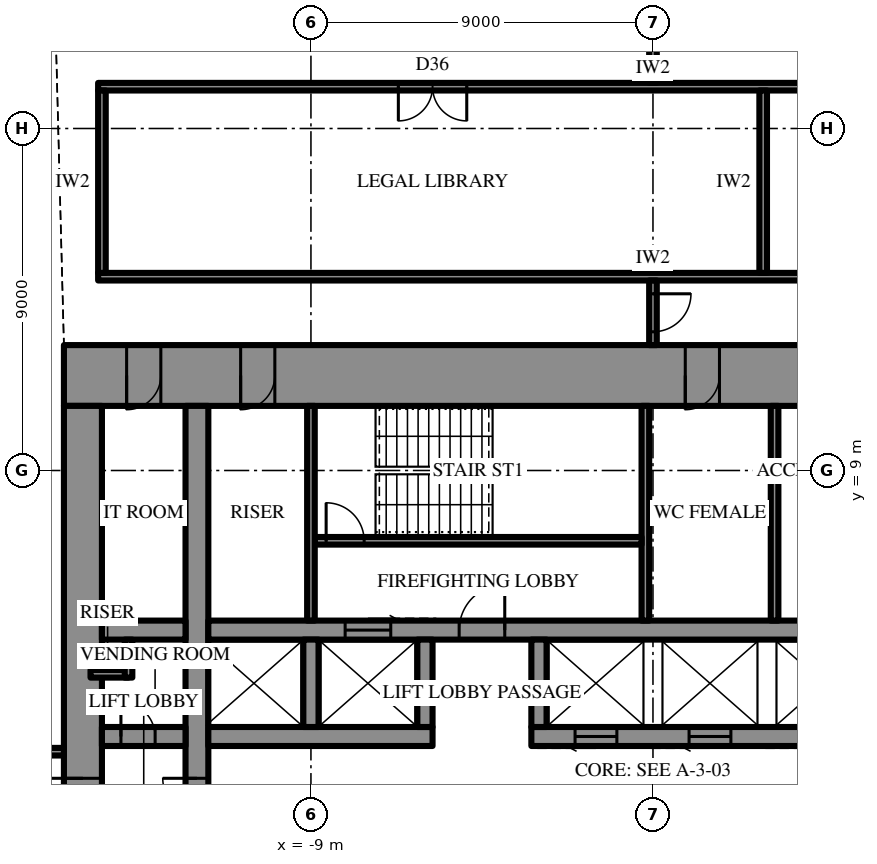
"""IFC4 building model, lengths in metres.
Left out: names, types, materials, properties, quantities, classifications, styles, units other than length and angle.
Written with IfcOpenShell. Run it as: python <this file> out.ifc"""

import sys

from ifc_helpers import new_model, si_unit, direction, frame, frame_2d, origin, place, context, subcontext, project, spatial, rectangle, extrude, element, fill, save


model = new_model("IFC4")
c1 = context("Model", 3, precision=1e-05, world=origin(), true_north=direction((0.0, 1.0)))
c2 = subcontext(c1, "Body", "Model", "MODEL_VIEW")
j1 = project(units=[si_unit("LENGTHUNIT", "METRE"), si_unit("PLANEANGLEUNIT", "RADIAN")], contexts=[c1])
p1 = place(None, origin())
s1 = spatial("IfcSite", under=j1, at=p1, CompositionType="ELEMENT")
p2 = place(p1, origin())
s2 = spatial("IfcBuilding", under=s1, at=p2, CompositionType="ELEMENT")
p3 = place(p2, frame((0.0, 0.0, 219.7)))
s3 = spatial("IfcBuildingStorey", under=s2, at=p3, CompositionType="ELEMENT", Elevation=219.7)
p4 = place(p3, frame((-15.5, 11.5, 0.0), z_axis=(0.0, 0.0, 1.0), x_axis=(1.0, 0.0, 0.0)))
e1 = element("IfcWall", 1, at=p4, inside=s3, PredefinedType="SHEAR", context=c2, shape_type="SweptSolid", body=[
    extrude(rectangle(XDim=31.0, YDim=1.6, at=frame_2d((15.5, 0.0))), origin(), (0.0, 0.0, 1.0), 4.2),
])
p5 = place(p4, frame((16.35, 0.0, 0.0)))
e2 = element("IfcOpeningElement", 2, at=p5, cuts=e1, PredefinedType="OPENING", context=c2, shape_type="SweptSolid", body=[
    extrude(rectangle(XDim=0.9, YDim=2.2, at=frame_2d((0.45, 1.1))), frame((0.0, 0.81, 0.0), z_axis=(0.0, -1.0, 0.0), x_axis=(1.0, 0.0, 0.0)), (0.0, 0.0, 1.0), 1.62),
])
p6 = place(p4, frame((19.35, 0.0, 0.0)))
e3 = element("IfcOpeningElement", 3, at=p6, cuts=e1, PredefinedType="OPENING", context=c2, shape_type="SweptSolid", body=[
    extrude(rectangle(XDim=0.9, YDim=2.2, at=frame_2d((0.45, 1.1))), frame((0.0, 0.81, 0.0), z_axis=(0.0, -1.0, 0.0), x_axis=(1.0, 0.0, 0.0)), (0.0, 0.0, 1.0), 1.62),
])
p7 = place(p4, frame((22.4, 0.0, 0.0)))
e4 = element("IfcOpeningElement", 4, at=p7, cuts=e1, PredefinedType="OPENING", context=c2, shape_type="SweptSolid", body=[
    extrude(rectangle(XDim=1.0, YDim=2.2, at=frame_2d((0.5, 1.1))), frame((0.0, 0.81, 0.0), z_axis=(0.0, -1.0, 0.0), x_axis=(1.0, 0.0, 0.0)), (0.0, 0.0, 1.0), 1.62),
])
p8 = place(p4, frame((1.65, 0.0, 0.0)))
e5 = element("IfcOpeningElement", 5, at=p8, cuts=e1, PredefinedType="OPENING", context=c2, shape_type="SweptSolid", body=[
    extrude(rectangle(XDim=0.9, YDim=2.2, at=frame_2d((0.45, 1.1))), frame((0.0, 0.81, 0.0), z_axis=(0.0, -1.0, 0.0), x_axis=(1.0, 0.0, 0.0)), (0.0, 0.0, 1.0), 1.62),
])
p9 = place(p4, frame((4.65, 0.0, 0.0)))
e6 = element("IfcOpeningElement", 6, at=p9, cuts=e1, PredefinedType="OPENING", context=c2, shape_type="SweptSolid", body=[
    extrude(rectangle(XDim=0.9, YDim=2.2, at=frame_2d((0.45, 1.1))), frame((0.0, 0.81, 0.0), z_axis=(0.0, -1.0, 0.0), x_axis=(1.0, 0.0, 0.0)), (0.0, 0.0, 1.0), 1.62),
])
p10 = place(p4, frame((25.45, 0.0, 0.0)))
e7 = element("IfcOpeningElement", 7, at=p10, cuts=e1, PredefinedType="OPENING", context=c2, shape_type="SweptSolid", body=[
    extrude(rectangle(XDim=0.9, YDim=2.2, at=frame_2d((0.45, 1.1))), frame((0.0, 0.81, 0.0), z_axis=(0.0, -1.0, 0.0), x_axis=(1.0, 0.0, 0.0)), (0.0, 0.0, 1.0), 1.62),
])
p11 = place(p4, frame((28.45, 0.0, 0.0)))
e8 = element("IfcOpeningElement", 8, at=p11, cuts=e1, PredefinedType="OPENING", context=c2, shape_type="SweptSolid", body=[
    extrude(rectangle(XDim=0.9, YDim=2.2, at=frame_2d((0.45, 1.1))), frame((0.0, 0.81, 0.0), z_axis=(0.0, -1.0, 0.0), x_axis=(1.0, 0.0, 0.0)), (0.0, 0.0, 1.0), 1.62),
])
p12 = place(p3, frame((-15.0, 10.7, 0.0), z_axis=(0.0, 0.0, 1.0), x_axis=(0.0, -1.0, 0.0)))
e9 = element("IfcWall", 9, at=p12, inside=s3, PredefinedType="SHEAR", context=c2, shape_type="SweptSolid", body=[
    extrude(rectangle(XDim=21.4, YDim=1.0, at=frame_2d((10.7, 0.0))), origin(), (0.0, 0.0, 1.0), 4.2),
])
p13 = place(p12, frame((9.8, 0.0, 0.0)))
e10 = element("IfcOpeningElement", 10, at=p13, cuts=e9, PredefinedType="OPENING", context=c2, shape_type="SweptSolid", body=[
    extrude(rectangle(XDim=1.8, YDim=2.4, at=frame_2d((0.9, 1.2))), frame((0.0, 0.51, 0.0), z_axis=(0.0, -1.0, 0.0), x_axis=(1.0, 0.0, 0.0)), (0.0, 0.0, 1.0), 1.02),
])
p14 = place(p3, frame((-12.0, -10.7, 0.0), z_axis=(0.0, 0.0, 1.0), x_axis=(0.0, 1.0, 0.0)))
e11 = element("IfcWall", 11, at=p14, inside=s3, PredefinedType="SHEAR", context=c2, shape_type="SweptSolid", body=[
    extrude(rectangle(XDim=21.4, YDim=0.6, at=frame_2d((10.7, 0.0))), origin(), (0.0, 0.0, 1.0), 4.2),
])
p15 = place(p14, frame((9.8, 0.0, 0.0)))
e12 = element("IfcOpeningElement", 12, at=p15, cuts=e11, PredefinedType="OPENING", context=c2, shape_type="SweptSolid", body=[
    extrude(rectangle(XDim=1.8, YDim=2.4, at=frame_2d((0.9, 1.2))), frame((0.0, 0.31, 0.0), z_axis=(0.0, -1.0, 0.0), x_axis=(1.0, 0.0, 0.0)), (0.0, 0.0, 1.0), 0.62),
])
p16 = place(p3, frame((-14.5, 2.0, 0.0), z_axis=(0.0, 0.0, 1.0), x_axis=(1.0, 0.0, 0.0)))
e13 = element("IfcWall", 13, at=p16, inside=s3, PredefinedType="SHEAR", context=c2, shape_type="SweptSolid", body=[
    extrude(rectangle(XDim=2.2, YDim=0.5, at=frame_2d((1.1, 0.0))), origin(), (0.0, 0.0, 1.0), 4.2),
])
p17 = place(p16, frame((0.5, 0.0, 0.0)))
e14 = element("IfcOpeningElement", 14, at=p17, cuts=e13, PredefinedType="OPENING", context=c2, shape_type="SweptSolid", body=[
    extrude(rectangle(XDim=0.9, YDim=2.2, at=frame_2d((0.45, 1.1))), frame((0.0, 0.26, 0.0), z_axis=(0.0, -1.0, 0.0), x_axis=(1.0, 0.0, 0.0)), (0.0, 0.0, 1.0), 0.52),
])
p18 = place(p3, frame((-11.7, 2.0, 0.0), z_axis=(0.0, 0.0, 1.0), x_axis=(1.0, 0.0, 0.0)))
e15 = element("IfcWall", 15, at=p18, inside=s3, PredefinedType="SHEAR", context=c2, shape_type="SweptSolid", body=[
    extrude(rectangle(XDim=5.9, YDim=0.5, at=frame_2d((2.95, 0.0))), origin(), (0.0, 0.0, 1.0), 4.2),
])
p19 = place(p3, frame((-3.2, 2.0, 0.0), z_axis=(0.0, 0.0, 1.0), x_axis=(1.0, 0.0, 0.0)))
e16 = element("IfcWall", 16, at=p19, inside=s3, PredefinedType="SHEAR", context=c2, shape_type="SweptSolid", body=[
    extrude(rectangle(XDim=14.9, YDim=0.5, at=frame_2d((7.45, 0.0))), origin(), (0.0, 0.0, 1.0), 4.2),
])
p20 = place(p19, frame((1.15, 0.0, 0.0)))
e17 = element("IfcOpeningElement", 17, at=p20, cuts=e16, PredefinedType="OPENING", context=c2, shape_type="SweptSolid", body=[
    extrude(rectangle(XDim=1.1, YDim=2.2, at=frame_2d((0.55, 1.1))), frame((0.0, 0.26, 0.0), z_axis=(0.0, -1.0, 0.0), x_axis=(1.0, 0.0, 0.0)), (0.0, 0.0, 1.0), 0.52),
])
p21 = place(p19, frame((4.15, 0.0, 0.0)))
e18 = element("IfcOpeningElement", 18, at=p21, cuts=e16, PredefinedType="OPENING", context=c2, shape_type="SweptSolid", body=[
    extrude(rectangle(XDim=1.1, YDim=2.2, at=frame_2d((0.55, 1.1))), frame((0.0, 0.26, 0.0), z_axis=(0.0, -1.0, 0.0), x_axis=(1.0, 0.0, 0.0)), (0.0, 0.0, 1.0), 0.52),
])
p22 = place(p19, frame((7.15, 0.0, 0.0)))
e19 = element("IfcOpeningElement", 19, at=p22, cuts=e16, PredefinedType="OPENING", context=c2, shape_type="SweptSolid", body=[
    extrude(rectangle(XDim=1.1, YDim=2.2, at=frame_2d((0.55, 1.1))), frame((0.0, 0.26, 0.0), z_axis=(0.0, -1.0, 0.0), x_axis=(1.0, 0.0, 0.0)), (0.0, 0.0, 1.0), 0.52),
])
p23 = place(p19, frame((10.15, 0.0, 0.0)))
e20 = element("IfcOpeningElement", 20, at=p23, cuts=e16, PredefinedType="OPENING", context=c2, shape_type="SweptSolid", body=[
    extrude(rectangle(XDim=1.1, YDim=2.2, at=frame_2d((0.55, 1.1))), frame((0.0, 0.26, 0.0), z_axis=(0.0, -1.0, 0.0), x_axis=(1.0, 0.0, 0.0)), (0.0, 0.0, 1.0), 0.52),
])
p24 = place(p3, frame((-14.5, 4.8, 0.0), z_axis=(0.0, 0.0, 1.0), x_axis=(1.0, 0.0, 0.0)))
e21 = element("IfcWall", 21, at=p24, inside=s3, PredefinedType="SHEAR", context=c2, shape_type="SweptSolid", body=[
    extrude(rectangle(XDim=2.2, YDim=0.5, at=frame_2d((1.1, 0.0))), origin(), (0.0, 0.0, 1.0), 4.2),
])
p25 = place(p3, frame((-11.7, 4.8, 0.0), z_axis=(0.0, 0.0, 1.0), x_axis=(1.0, 0.0, 0.0)))
e22 = element("IfcWall", 22, at=p25, inside=s3, PredefinedType="SHEAR", context=c2, shape_type="SweptSolid", body=[
    extrude(rectangle(XDim=23.4, YDim=0.5, at=frame_2d((11.7, 0.0))), origin(), (0.0, 0.0, 1.0), 4.2),
])
p26 = place(p25, frame((6.6, 0.0, 0.0)))
e23 = element("IfcOpeningElement", 23, at=p26, cuts=e22, PredefinedType="OPENING", context=c2, shape_type="SweptSolid", body=[
    extrude(rectangle(XDim=1.2, YDim=2.2, at=frame_2d((0.6, 1.1))), frame((0.0, 0.26, 0.0), z_axis=(0.0, -1.0, 0.0), x_axis=(1.0, 0.0, 0.0)), (0.0, 0.0, 1.0), 0.52),
])
p27 = place(p25, frame((3.6, 0.0, 0.0)))
e24 = element("IfcOpeningElement", 24, at=p27, cuts=e22, PredefinedType="OPENING", context=c2, shape_type="SweptSolid", body=[
    extrude(rectangle(XDim=1.2, YDim=2.2, at=frame_2d((0.6, 1.1))), frame((0.0, 0.26, 0.0), z_axis=(0.0, -1.0, 0.0), x_axis=(1.0, 0.0, 0.0)), (0.0, 0.0, 1.0), 0.52),
])
for number, where, z_axis, x_axis in (
    (25, (-9.0, 2.25, 0.0), (0.0, 0.0, 1.0), (0.0, 1.0, 0.0)),
    (26, (-6.0, 2.25, 0.0), (0.0, 0.0, 1.0), (0.0, 1.0, 0.0)),
    (27, (-3.0, 2.25, 0.0), (0.0, 0.0, 1.0), (0.0, 1.0, 0.0)),
):
    element("IfcWall", number, at=place(p3, frame(where, z_axis=z_axis, x_axis=x_axis)), inside=s3, PredefinedType="SHEAR", context=c2, shape_type="SweptSolid", body=[
        extrude(rectangle(XDim=2.3, YDim=0.4, at=frame_2d((1.15, 0.0))), origin(), (0.0, 0.0, 1.0), 4.2),
    ])
p28 = place(p3, frame((-0.2, 5.05, 0.0), z_axis=(0.0, 0.0, 1.0), x_axis=(0.0, 1.0, 0.0)))
e28 = element("IfcWall", 28, at=p28, inside=s3, PredefinedType="SHEAR", context=c2, shape_type="SweptSolid", body=[
    extrude(rectangle(XDim=5.65, YDim=0.2, at=frame_2d((2.825, 0.0))), origin(), (0.0, 0.0, 1.0), 4.2),
])
p29 = place(p3, frame((-8.9, 7.15, 0.0), z_axis=(0.0, 0.0, 1.0), x_axis=(1.0, 0.0, 0.0)))
e29 = element("IfcWall", 29, at=p29, inside=s3, PredefinedType="SHEAR", context=c2, shape_type="SweptSolid", body=[
    extrude(rectangle(XDim=8.6, YDim=0.2, at=frame_2d((4.3, 0.0))), origin(), (0.0, 0.0, 1.0), 4.2),
])
p30 = place(p29, frame((0.3, 0.0, 0.0)))
e30 = element("IfcOpeningElement", 30, at=p30, cuts=e29, PredefinedType="OPENING", context=c2, shape_type="SweptSolid", body=[
    extrude(rectangle(XDim=1.0, YDim=2.2, at=frame_2d((0.5, 1.1))), frame((0.0, 0.11, 0.0), z_axis=(0.0, -1.0, 0.0), x_axis=(1.0, 0.0, 0.0)), (0.0, 0.0, 1.0), 0.22),
])
for number, where, z_axis, x_axis in (
    (31, (-9.0, 5.05, 0.0), (0.0, 0.0, 1.0), (0.0, 1.0, 0.0)),
    (32, (3.2, 5.05, 0.0), (0.0, 0.0, 1.0), (0.0, 1.0, 0.0)),
):
    element("IfcWall", number, at=place(p3, frame(where, z_axis=z_axis, x_axis=x_axis)), inside=s3, PredefinedType="PARTITIONING", context=c2, shape_type="SweptSolid", body=[
        extrude(rectangle(XDim=5.65, YDim=0.2, at=frame_2d((2.825, 0.0))), origin(), (0.0, 0.0, 1.0), 4.0),
    ])
for number, where, z_axis, x_axis in (
    (33, (-14.8, 3.65, 0.0), (0.0, 0.0, 1.0), (1.0, 0.0, 0.0)),
    (34, (-13.8, 3.55, 0.0), (0.0, 0.0, 1.0), (0.0, 1.0, 0.0)),
):
    element("IfcWall", number, at=place(p3, frame(where, z_axis=z_axis, x_axis=x_axis)), inside=s3, PredefinedType="PARTITIONING", context=c2, shape_type="SweptSolid", body=[
        extrude(rectangle(XDim=1.0, YDim=0.2, at=frame_2d((0.5, 0.0))), origin(), (0.0, 0.0, 1.0), 4.0),
    ])
p31 = place(p3, frame((-14.6, 14.1, 0.0), z_axis=(0.0, 0.0, 1.0), x_axis=(1.0, 0.0, 0.0)))
e35 = element("IfcWall", 35, at=p31, inside=s3, PredefinedType="PARTITIONING", context=c2, shape_type="SweptSolid", body=[
    extrude(rectangle(XDim=29.2, YDim=0.2, at=frame_2d((14.6, 0.0))), origin(), (0.0, 0.0, 1.0), 4.0),
])
p32 = place(p3, frame((-14.6, 19.1, 0.0), z_axis=(0.0, 0.0, 1.0), x_axis=(1.0, 0.0, 0.0)))
e36 = element("IfcWall", 36, at=p32, inside=s3, PredefinedType="PARTITIONING", context=c2, shape_type="SweptSolid", body=[
    extrude(rectangle(XDim=29.2, YDim=0.2, at=frame_2d((14.6, 0.0))), origin(), (0.0, 0.0, 1.0), 4.0),
])
p33 = place(p32, frame((7.9, 0.0, 0.0)))
e37 = element("IfcOpeningElement", 37, at=p33, cuts=e36, PredefinedType="OPENING", context=c2, shape_type="SweptSolid", body=[
    extrude(rectangle(XDim=1.8, YDim=2.4, at=frame_2d((0.9, 1.2))), frame((0.0, 0.11, 0.0), z_axis=(0.0, -1.0, 0.0), x_axis=(1.0, 0.0, 0.0)), (0.0, 0.0, 1.0), 0.22),
])
p34 = place(p32, frame((22.4, 0.0, 0.0)))
e38 = element("IfcOpeningElement", 38, at=p34, cuts=e36, PredefinedType="OPENING", context=c2, shape_type="SweptSolid", body=[
    extrude(rectangle(XDim=1.8, YDim=2.4, at=frame_2d((0.9, 1.2))), frame((0.0, 0.11, 0.0), z_axis=(0.0, -1.0, 0.0), x_axis=(1.0, 0.0, 0.0)), (0.0, 0.0, 1.0), 0.22),
])
for number, where, z_axis, x_axis in (
    (39, (-14.5, 14.2, 0.0), (0.0, 0.0, 1.0), (0.0, 1.0, 0.0)),
    (40, (2.9, 14.2, 0.0), (0.0, 0.0, 1.0), (0.0, 1.0, 0.0)),
):
    element("IfcWall", number, at=place(p3, frame(where, z_axis=z_axis, x_axis=x_axis)), inside=s3, PredefinedType="PARTITIONING", context=c2, shape_type="SweptSolid", body=[
        extrude(rectangle(XDim=4.8, YDim=0.2, at=frame_2d((2.4, 0.0))), origin(), (0.0, 0.0, 1.0), 4.0),
    ])
p35 = place(p3, frame((-15.5, 1.6, 0.0), z_axis=(0.0, 0.0, 1.0), x_axis=(-1.0, 0.0, 0.0)))
e41 = element("IfcWall", 41, at=p35, inside=s3, PredefinedType="PARTITIONING", context=c2, shape_type="SweptSolid", body=[
    extrude(rectangle(XDim=12.2, YDim=0.2, at=frame_2d((6.1, 0.0))), origin(), (0.0, 0.0, 1.0), 4.0),
])
p36 = place(p35, frame((3.16, 0.0, 0.0)))
e42 = element("IfcOpeningElement", 42, at=p36, cuts=e41, PredefinedType="OPENING", context=c2, shape_type="SweptSolid", body=[
    extrude(rectangle(XDim=1.0, YDim=2.2, at=frame_2d((0.5, 1.1))), frame((0.0, 0.11, 0.0), z_axis=(0.0, -1.0, 0.0), x_axis=(1.0, 0.0, 0.0)), (0.0, 0.0, 1.0), 0.22),
])
p37 = place(p3, frame((0.0, 12.3, 0.0), z_axis=(0.0, 0.0, 1.0), x_axis=(0.0, 1.0, 0.0)))
e43 = element("IfcWall", 43, at=p37, inside=s3, PredefinedType="PARTITIONING", context=c2, shape_type="SweptSolid", body=[
    extrude(rectangle(XDim=1.7, YDim=0.2, at=frame_2d((0.85, 0.0))), origin(), (0.0, 0.0, 1.0), 2.992),
])
p38 = place(p37, frame((0.35, 0.0, 0.0)))
e44 = element("IfcOpeningElement", 44, at=p38, cuts=e43, PredefinedType="OPENING", context=c2, shape_type="SweptSolid", body=[
    extrude(rectangle(XDim=1.0, YDim=2.2, at=frame_2d((0.5, 1.1))), frame((0.0, 0.11, 0.0), z_axis=(0.0, -1.0, 0.0), x_axis=(1.0, 0.0, 0.0)), (0.0, 0.0, 1.0), 0.22),
])
p39 = place(p3, frame((0.0, 19.2, 0.0), z_axis=(0.0, 0.0, 1.0), x_axis=(0.0, 1.0, 0.0)))
e45 = element("IfcWall", 45, at=p39, inside=s3, PredefinedType="PARTITIONING", context=c2, shape_type="SweptSolid", body=[
    extrude(rectangle(XDim=5.2, YDim=0.2, at=frame_2d((2.6, 0.0))), origin(), (0.0, 0.0, 1.0), 2.992),
])
p40 = place(p13, frame((1.8, 0.0, 0.0), z_axis=(0.0, 0.0, 1.0), x_axis=(-1.0, 0.0, 0.0)))
e46 = element("IfcDoor", 46, at=p40, inside=s3, OperationType="DOUBLE_DOOR_SINGLE_SWING", PredefinedType="DOOR", context=c2, shape_type="SweptSolid", body=[
    extrude(rectangle(XDim=1.8, YDim=2.4, at=frame_2d((0.9, 1.2))), frame((0.0, 0.025, 0.0), z_axis=(0.0, -1.0, 0.0), x_axis=(1.0, 0.0, 0.0)), (0.0, 0.0, 1.0), 0.05),
])
fill(e10, e46)
p41 = place(p26, origin())
e47 = element("IfcDoor", 47, at=p41, inside=s3, OperationType="SINGLE_SWING_LEFT", PredefinedType="DOOR", context=c2, shape_type="SweptSolid", body=[
    extrude(rectangle(XDim=1.2, YDim=2.2, at=frame_2d((0.6, 1.1))), frame((0.0, 0.025, 0.0), z_axis=(0.0, -1.0, 0.0), x_axis=(1.0, 0.0, 0.0)), (0.0, 0.0, 1.0), 0.05),
])
fill(e23, e47)
p42 = place(p30, origin())
e48 = element("IfcDoor", 48, at=p42, inside=s3, OperationType="SINGLE_SWING_RIGHT", PredefinedType="DOOR", context=c2, shape_type="SweptSolid", body=[
    extrude(rectangle(XDim=1.0, YDim=2.2, at=frame_2d((0.5, 1.1))), frame((0.0, 0.025, 0.0), z_axis=(0.0, -1.0, 0.0), x_axis=(1.0, 0.0, 0.0)), (0.0, 0.0, 1.0), 0.05),
])
fill(e30, e48)
p43 = place(p5, frame((0.9, 0.0, 0.0), z_axis=(0.0, 0.0, 1.0), x_axis=(-1.0, 0.0, 0.0)))
e49 = element("IfcDoor", 49, at=p43, inside=s3, OperationType="SINGLE_SWING_LEFT", PredefinedType="DOOR", context=c2, shape_type="SweptSolid", body=[
    extrude(rectangle(XDim=0.9, YDim=2.2, at=frame_2d((0.45, 1.1))), frame((0.0, 0.025, 0.0), z_axis=(0.0, -1.0, 0.0), x_axis=(1.0, 0.0, 0.0)), (0.0, 0.0, 1.0), 0.05),
])
fill(e2, e49)
p44 = place(p8, frame((0.9, 0.0, 0.0), z_axis=(0.0, 0.0, 1.0), x_axis=(-1.0, 0.0, 0.0)))
e50 = element("IfcDoor", 50, at=p44, inside=s3, OperationType="SINGLE_SWING_LEFT", PredefinedType="DOOR", context=c2, shape_type="SweptSolid", body=[
    extrude(rectangle(XDim=0.9, YDim=2.2, at=frame_2d((0.45, 1.1))), frame((0.0, 0.025, 0.0), z_axis=(0.0, -1.0, 0.0), x_axis=(1.0, 0.0, 0.0)), (0.0, 0.0, 1.0), 0.05),
])
fill(e5, e50)
p45 = place(p9, frame((0.9, 0.0, 0.0), z_axis=(0.0, 0.0, 1.0), x_axis=(-1.0, 0.0, 0.0)))
e51 = element("IfcDoor", 51, at=p45, inside=s3, OperationType="SINGLE_SWING_LEFT", PredefinedType="DOOR", context=c2, shape_type="SweptSolid", body=[
    extrude(rectangle(XDim=0.9, YDim=2.2, at=frame_2d((0.45, 1.1))), frame((0.0, 0.025, 0.0), z_axis=(0.0, -1.0, 0.0), x_axis=(1.0, 0.0, 0.0)), (0.0, 0.0, 1.0), 0.05),
])
fill(e6, e51)
p46 = place(p17, origin())
e52 = element("IfcDoor", 52, at=p46, inside=s3, OperationType="SINGLE_SWING_RIGHT", PredefinedType="DOOR", context=c2, shape_type="SweptSolid", body=[
    extrude(rectangle(XDim=0.9, YDim=2.2, at=frame_2d((0.45, 1.1))), frame((0.0, 0.025, 0.0), z_axis=(0.0, -1.0, 0.0), x_axis=(1.0, 0.0, 0.0)), (0.0, 0.0, 1.0), 0.05),
])
fill(e14, e52)
p47 = place(p15, origin())
e53 = element("IfcDoor", 53, at=p47, inside=s3, OperationType="DOUBLE_DOOR_SINGLE_SWING", PredefinedType="DOOR", context=c2, shape_type="SweptSolid", body=[
    extrude(rectangle(XDim=1.8, YDim=2.4, at=frame_2d((0.9, 1.2))), frame((0.0, 0.025, 0.0), z_axis=(0.0, -1.0, 0.0), x_axis=(1.0, 0.0, 0.0)), (0.0, 0.0, 1.0), 0.05),
])
fill(e12, e53)
p48 = place(p27, origin())
e54 = element("IfcDoor", 54, at=p48, inside=s3, OperationType="SLIDING_TO_LEFT", PredefinedType="DOOR", context=c2, shape_type="SweptSolid", body=[
    extrude(rectangle(XDim=1.2, YDim=2.2, at=frame_2d((0.6, 1.1))), frame((0.0, 0.025, 0.0), z_axis=(0.0, -1.0, 0.0), x_axis=(1.0, 0.0, 0.0)), (0.0, 0.0, 1.0), 0.05),
])
fill(e24, e54)
p49 = place(p20, frame((1.1, 0.0, 0.0), z_axis=(0.0, 0.0, 1.0), x_axis=(-1.0, 0.0, 0.0)))
e55 = element("IfcDoor", 55, at=p49, inside=s3, OperationType="SLIDING_TO_LEFT", PredefinedType="DOOR", context=c2, shape_type="SweptSolid", body=[
    extrude(rectangle(XDim=1.1, YDim=2.2, at=frame_2d((0.55, 1.1))), frame((0.0, 0.025, 0.0), z_axis=(0.0, -1.0, 0.0), x_axis=(1.0, 0.0, 0.0)), (0.0, 0.0, 1.0), 0.05),
])
fill(e17, e55)
p50 = place(p21, frame((1.1, 0.0, 0.0), z_axis=(0.0, 0.0, 1.0), x_axis=(-1.0, 0.0, 0.0)))
e56 = element("IfcDoor", 56, at=p50, inside=s3, OperationType="SLIDING_TO_LEFT", PredefinedType="DOOR", context=c2, shape_type="SweptSolid", body=[
    extrude(rectangle(XDim=1.1, YDim=2.2, at=frame_2d((0.55, 1.1))), frame((0.0, 0.025, 0.0), z_axis=(0.0, -1.0, 0.0), x_axis=(1.0, 0.0, 0.0)), (0.0, 0.0, 1.0), 0.05),
])
fill(e18, e56)
p51 = place(p33, frame((1.8, 0.0, 0.0), z_axis=(0.0, 0.0, 1.0), x_axis=(-1.0, 0.0, 0.0)))
e57 = element("IfcDoor", 57, at=p51, inside=s3, OperationType="DOUBLE_DOOR_SINGLE_SWING", PredefinedType="DOOR", context=c2, shape_type="SweptSolid", body=[
    extrude(rectangle(XDim=1.8, YDim=2.4, at=frame_2d((0.9, 1.2))), frame((0.0, 0.025, 0.0), z_axis=(0.0, -1.0, 0.0), x_axis=(1.0, 0.0, 0.0)), (0.0, 0.0, 1.0), 0.05),
])
fill(e37, e57)
p52 = place(p38, frame((1.0, 0.0, 0.0), z_axis=(0.0, 0.0, 1.0), x_axis=(-1.0, 0.0, 0.0)))
e58 = element("IfcDoor", 58, at=p52, inside=s3, OperationType="SINGLE_SWING_RIGHT", PredefinedType="DOOR", context=c2, shape_type="SweptSolid", body=[
    extrude(rectangle(XDim=1.0, YDim=2.2, at=frame_2d((0.5, 1.1))), frame((0.0, 0.025, 0.0), z_axis=(0.0, -1.0, 0.0), x_axis=(1.0, 0.0, 0.0)), (0.0, 0.0, 1.0), 0.05),
])
fill(e44, e58)
save(model, sys.argv[1])
